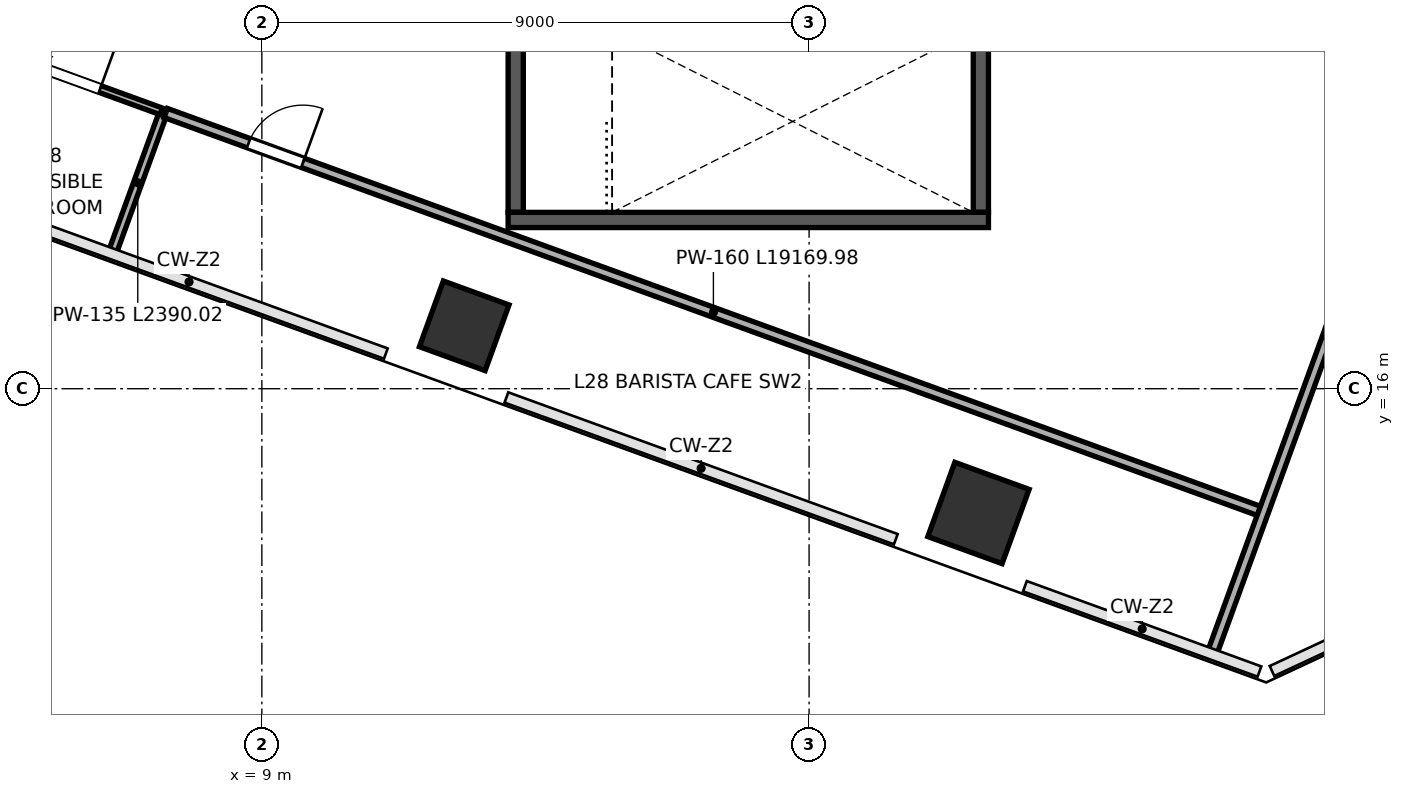
"""IFC4 building model, lengths in metres.
Left out: names, types, materials, properties, quantities, classifications, styles, units other than length and angle.
Written with IfcOpenShell. Run it as: python <this file> out.ifc"""

import sys

from ifc_helpers import new_model, si_unit, direction, frame, frame_2d, origin, origin_2d, place, context, subcontext, project, spatial, rectangle, extrude, source, transform, mapped, element, fill, save


model = new_model("IFC4")
c1 = context("Model", 3, precision=1e-05, world=origin(), true_north=direction((0.0, 1.0)))
c2 = subcontext(c1, "Body", "Model", "MODEL_VIEW")
j1 = project(units=[si_unit("LENGTHUNIT", "METRE"), si_unit("PLANEANGLEUNIT", "RADIAN")], contexts=[c1])
p1 = place(None, origin())
s1 = spatial("IfcSite", under=j1, at=p1, CompositionType="ELEMENT")
p2 = place(p1, origin())
s2 = spatial("IfcBuilding", under=s1, at=p2, CompositionType="ELEMENT")
p3 = place(p2, frame((0.0, 0.0, 127.6)))
s3 = spatial("IfcBuildingStorey", under=s2, at=p3, CompositionType="ELEMENT", Elevation=127.6)
m1 = source(origin(), c2, "Body", "SweptSolid", [
    extrude(rectangle(XDim=1.15, YDim=1.15, at=origin_2d()), origin(), (0.0, 0.0, 1.0), 5.398),
])
p4 = place(p3, frame((12.328, 17.034, 0.001), z_axis=(0.0, 0.0, 1.0), x_axis=(-0.939692620786, 0.342020143326, 0.0)))
e1 = element("IfcColumn", 1, at=p4, inside=s3, PredefinedType="COLUMN", context=c2, shape_type="MappedRepresentation", body=[
    mapped(m1, transform((0.0, 0.0, 0.0), scale=1.0)),
])
m2 = source(origin(), c2, "Body", "SweptSolid", [
    extrude(rectangle(XDim=1.3, YDim=1.3, at=origin_2d()), origin(), (0.0, 0.0, 1.0), 5.398),
])
p5 = place(p3, frame((20.786, 13.956, 0.001), z_axis=(0.0, 0.0, 1.0), x_axis=(-0.939692620786, 0.342020143326, 0.0)))
e2 = element("IfcColumn", 2, at=p5, inside=s3, PredefinedType="COLUMN", context=c2, shape_type="MappedRepresentation", body=[
    mapped(m2, transform((0.0, 0.0, 0.0), scale=1.0)),
])
for number, where, z_axis, x_axis in (
    (3, (13.175, 18.9, 0.0), (0.0, 0.0, 1.0), (0.0, 1.0, 0.0)),
    (4, (20.825, 18.9, 0.0), (0.0, 0.0, 1.0), (0.0, 1.0, 0.0)),
):
    element("IfcWall", number, at=place(p3, frame(where, z_axis=z_axis, x_axis=x_axis)), inside=s3, PredefinedType="SHEAR", context=c2, shape_type="SweptSolid", body=[
        extrude(rectangle(XDim=2.99, YDim=0.25, at=frame_2d((1.495, 0.0))), origin(), (0.0, 0.0, 1.0), 5.16),
    ])
p6 = place(p3, frame((13.05, 18.775, 0.0), z_axis=(0.0, 0.0, 1.0), x_axis=(1.0, 0.0, 0.0)))
e5 = element("IfcWall", 5, at=p6, inside=s3, PredefinedType="SHEAR", context=c2, shape_type="SweptSolid", body=[
    extrude(rectangle(XDim=7.9, YDim=0.25, at=frame_2d((3.95, 0.0))), origin(), (0.0, 0.0, 1.0), 5.16),
])
p7 = place(p3, frame((6.551, 18.265, 0.0), z_axis=(0.0, 0.0, 1.0), x_axis=(0.342005513766, 0.939697945381, 0.0)))
e6 = element("IfcWall", 6, at=p7, inside=s3, PredefinedType="PARTITIONING", context=c2, shape_type="SweptSolid", body=[
    extrude(rectangle(XDim=2.39, YDim=0.135, at=frame_2d((1.195, 0.0))), origin(), (0.0, 0.0, 1.0), 4.395),
])
p8 = place(p3, frame((0.372, 23.1, 0.0), z_axis=(0.0, 0.0, 1.0), x_axis=(0.939692513883, -0.342020437038, 0.0)))
e7 = element("IfcWall", 7, at=p8, inside=s3, PredefinedType="PARTITIONING", context=c2, shape_type="SweptSolid", body=[
    extrude(rectangle(XDim=7.42, YDim=0.115, at=frame_2d((3.71, 0.0))), origin(), (0.0, 0.0, 1.0), 5.16),
])
p9 = place(p8, frame((2.1, 0.0, 0.0)))
e8 = element("IfcOpeningElement", 8, at=p9, cuts=e7, PredefinedType="OPENING", context=c2, shape_type="SweptSolid", body=[
    extrude(rectangle(XDim=0.9, YDim=2.15, at=frame_2d((0.45, 1.075))), frame((0.0, 0.067, 0.0), z_axis=(0.0, -1.0, 0.0), x_axis=(1.0, 0.0, 0.0)), (0.0, 0.0, 1.0), 0.135),
])
p10 = place(p8, frame((5.4, 0.0, 0.0)))
e9 = element("IfcOpeningElement", 9, at=p10, cuts=e7, PredefinedType="OPENING", context=c2, shape_type="SweptSolid", body=[
    extrude(rectangle(XDim=0.95, YDim=2.15, at=frame_2d((0.475, 1.075))), frame((0.0, 0.067, 0.0), z_axis=(0.0, -1.0, 0.0), x_axis=(1.0, 0.0, 0.0)), (0.0, 0.0, 1.0), 0.135),
])
p11 = place(p3, frame((7.419, 20.534, 0.0), z_axis=(0.0, 0.0, 1.0), x_axis=(0.939690753226, -0.34202527436, 0.0)))
e10 = element("IfcWall", 10, at=p11, inside=s3, PredefinedType="PARTITIONING", context=c2, shape_type="SweptSolid", body=[
    extrude(rectangle(XDim=19.17, YDim=0.16, at=frame_2d((9.585, 0.0))), origin(), (0.0, 0.0, 1.0), 5.16),
])
p12 = place(p11, frame((1.45, 0.0, 0.0)))
e11 = element("IfcOpeningElement", 11, at=p12, cuts=e10, PredefinedType="OPENING", context=c2, shape_type="SweptSolid", body=[
    extrude(rectangle(XDim=0.95, YDim=2.15, at=frame_2d((0.475, 1.075))), frame((0.0, 0.09, 0.0), z_axis=(0.0, -1.0, 0.0), x_axis=(1.0, 0.0, 0.0)), (0.0, 0.0, 1.0), 0.18),
])
p13 = place(p3, frame((24.64, 11.681, 0.0), z_axis=(0.0, 0.0, 1.0), x_axis=(0.342014151498, 0.939694801611, 0.0)))
e12 = element("IfcWall", 12, at=p13, inside=s3, PredefinedType="PARTITIONING", context=c2, shape_type="SweptSolid", body=[
    extrude(rectangle(XDim=20.68, YDim=0.16, at=frame_2d((10.34, 0.0))), origin(), (0.0, 0.0, 1.0), 5.16),
])
m3 = source(origin(), c2, "Body", "SweptSolid", [
    extrude(rectangle(XDim=0.95, YDim=2.15, at=frame_2d((0.475, 1.075))), frame((0.0, 0.025, 0.0), z_axis=(0.0, -1.0, 0.0), x_axis=(1.0, 0.0, 0.0)), (0.0, 0.0, 1.0), 0.05),
])
p14 = place(p10, origin())
e13 = element("IfcDoor", 13, at=p14, inside=s3, OperationType="SINGLE_SWING_RIGHT", PredefinedType="DOOR", context=c2, shape_type="MappedRepresentation", body=[
    mapped(m3, transform((0.0, 0.0, 0.0), scale=1.0)),
])
fill(e9, e13)
m4 = source(origin(), c2, "Body", "SweptSolid", [
    extrude(rectangle(XDim=0.95, YDim=2.15, at=frame_2d((0.475, 1.075))), frame((0.0, 0.025, 0.0), z_axis=(0.0, -1.0, 0.0), x_axis=(1.0, 0.0, 0.0)), (0.0, 0.0, 1.0), 0.05),
])
p15 = place(p12, origin())
e14 = element("IfcDoor", 14, at=p15, inside=s3, OperationType="SINGLE_SWING_RIGHT", PredefinedType="DOOR", context=c2, shape_type="MappedRepresentation", body=[
    mapped(m4, transform((0.0, 0.0, 0.0), scale=1.0)),
])
fill(e11, e14)
save(model, sys.argv[1])
